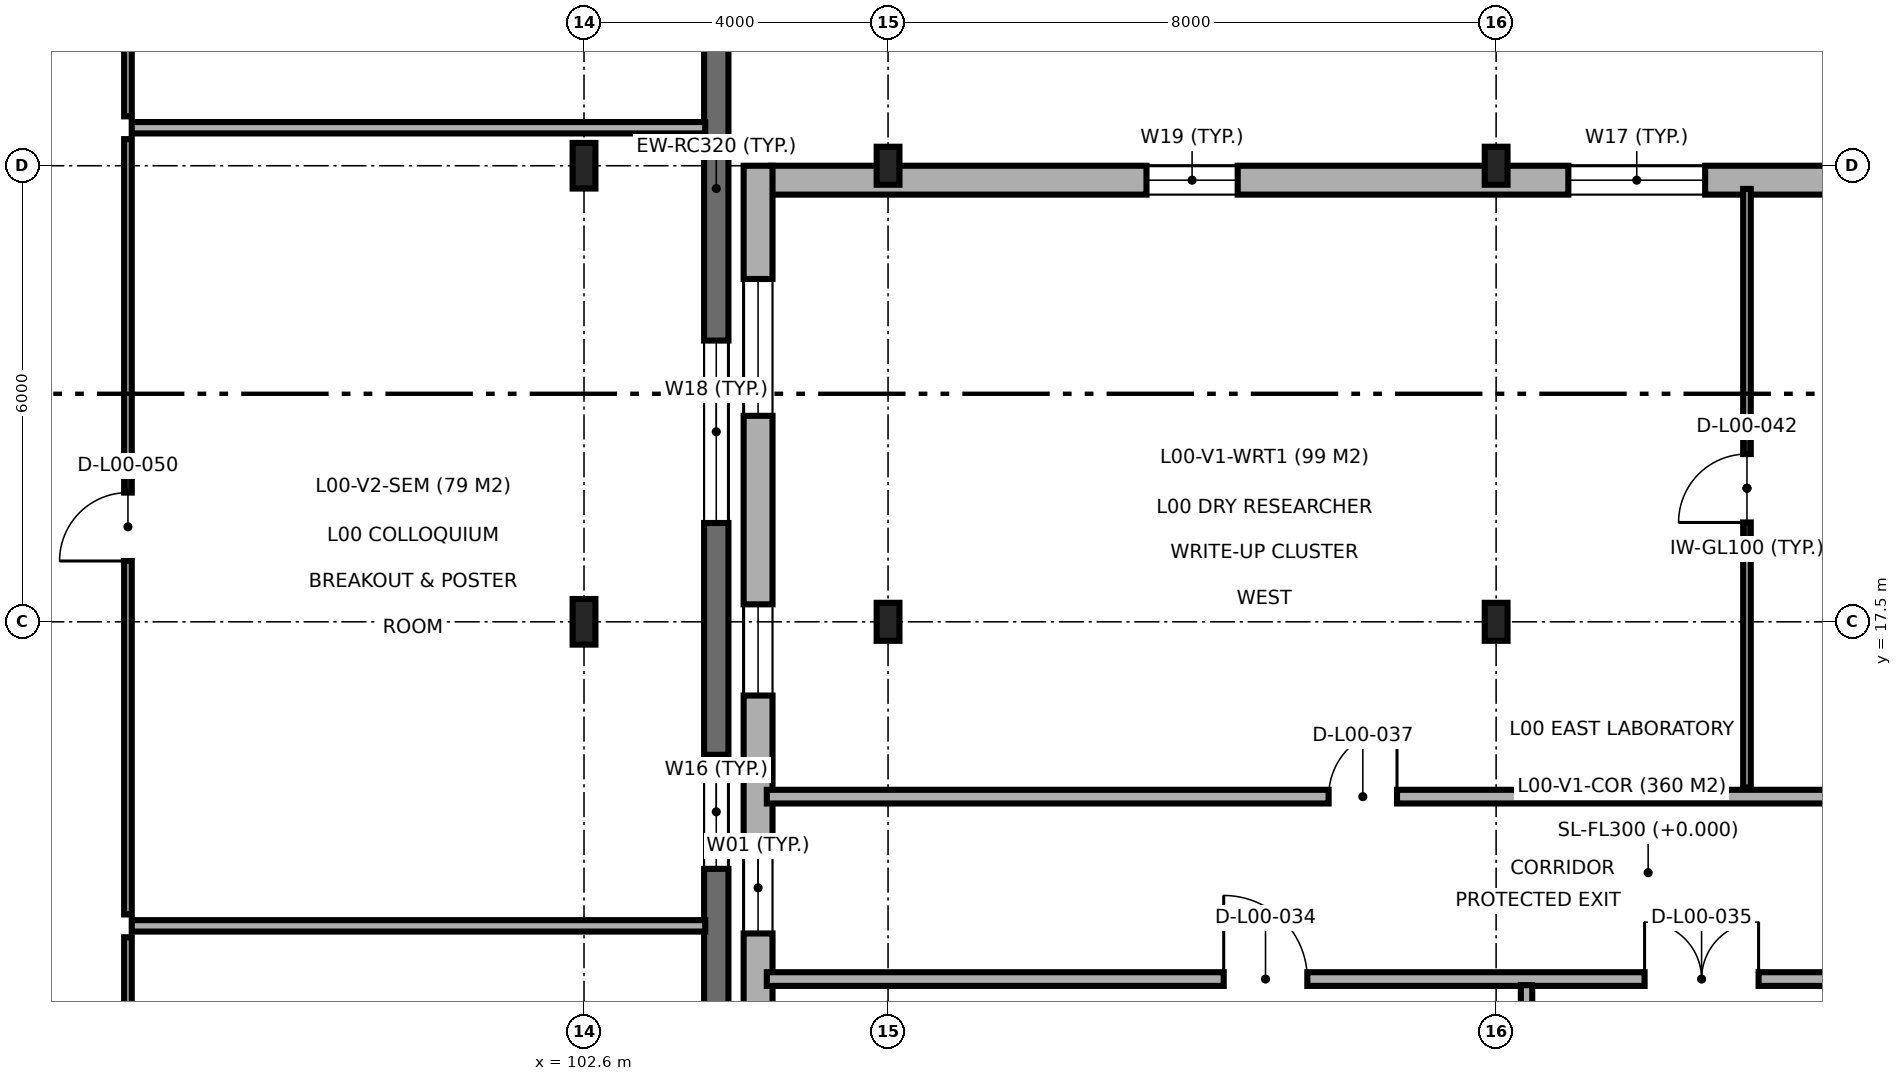
"""IFC4 building model, lengths in metres.
Left out: names, types, materials, properties, quantities, classifications, styles, units other than length and angle.
Written with IfcOpenShell. Run it as: python <this file> out.ifc"""

import sys

from ifc_helpers import new_model, si_unit, direction, frame, frame_2d, origin, origin_2d, place, context, subcontext, project, spatial, rectangle, i_section, extrude, element, fill, save


model = new_model("IFC4")
c1 = context("Model", 3, precision=1e-05, world=origin(), true_north=direction((0.0, 1.0)))
c2 = subcontext(c1, "Body", "Model", "MODEL_VIEW")
j1 = project(units=[si_unit("LENGTHUNIT", "METRE"), si_unit("PLANEANGLEUNIT", "RADIAN")], contexts=[c1])
p1 = place(None, origin())
s1 = spatial("IfcSite", under=j1, at=p1, CompositionType="ELEMENT")
p2 = place(p1, origin())
s2 = spatial("IfcBuilding", under=s1, at=p2, CompositionType="ELEMENT")
p3 = place(p2, origin())
s3 = spatial("IfcBuildingStorey", under=s2, at=p3, CompositionType="ELEMENT", Elevation=0.0)
for number, where, z_axis, x_axis in (
    (1, (102.6, 17.5, 0.0), (0.0, 0.0, 1.0), (1.0, 0.0, 0.0)),
    (2, (102.6, 23.5, 0.0), (0.0, 0.0, 1.0), (1.0, 0.0, 0.0)),
):
    element("IfcColumn", number, at=place(p3, frame(where, z_axis=z_axis, x_axis=x_axis)), inside=s3, PredefinedType="COLUMN", context=c2, shape_type="SweptSolid", body=[
        extrude(i_section(OverallWidth=0.3, OverallDepth=0.6, WebThickness=0.015, FlangeThickness=0.03, FilletRadius=0.027, at=origin_2d()), origin(), (0.0, 0.0, 1.0), 4.8),
    ])
for number, where, z_axis, x_axis in (
    (3, (106.6, 17.5, 0.0), (0.0, 0.0, 1.0), (1.0, 0.0, 0.0)),
    (4, (106.6, 23.5, 0.0), (0.0, 0.0, 1.0), (1.0, 0.0, 0.0)),
    (5, (114.6, 17.5, 0.0), (0.0, 0.0, 1.0), (1.0, 0.0, 0.0)),
    (6, (114.6, 23.5, 0.0), (0.0, 0.0, 1.0), (1.0, 0.0, 0.0)),
):
    element("IfcColumn", number, at=place(p3, frame(where, z_axis=z_axis, x_axis=x_axis)), inside=s3, PredefinedType="COLUMN", context=c2, shape_type="SweptSolid", body=[
        extrude(i_section(OverallWidth=0.3, OverallDepth=0.5, WebThickness=0.014, FlangeThickness=0.028, FilletRadius=0.027, at=origin_2d()), origin(), (0.0, 0.0, 1.0), 4.8),
    ])
p4 = place(p3, frame((138.962, 23.31, 0.0), z_axis=(0.0, 0.0, 1.0), x_axis=(-1.0, 0.0, 0.0)))
e7 = element("IfcWall", 7, at=p4, inside=s3, PredefinedType="SOLIDWALL", context=c2, shape_type="SweptSolid", body=[
    extrude(rectangle(XDim=33.9, YDim=0.38, at=frame_2d((16.95, 0.0))), origin(), (0.0, 0.0, 1.0), 4.55),
])
p5 = place(p4, frame((3.232, 0.0, 0.9)))
e8 = element("IfcOpeningElement", 8, at=p5, cuts=e7, PredefinedType="OPENING", context=c2, shape_type="SweptSolid", body=[
    extrude(rectangle(XDim=2.1, YDim=2.1, at=frame_2d((1.05, 1.05))), frame((0.0, 0.2, 0.0), z_axis=(0.0, -1.0, 0.0), x_axis=(1.0, 0.0, 0.0)), (0.0, 0.0, 1.0), 0.4),
])
p6 = place(p4, frame((11.542, 0.0, 0.9)))
e9 = element("IfcOpeningElement", 9, at=p6, cuts=e7, PredefinedType="OPENING", context=c2, shape_type="SweptSolid", body=[
    extrude(rectangle(XDim=2.7, YDim=2.1, at=frame_2d((1.35, 1.05))), frame((0.0, 0.2, 0.0), z_axis=(0.0, -1.0, 0.0), x_axis=(1.0, 0.0, 0.0)), (0.0, 0.0, 1.0), 0.4),
])
p7 = place(p4, frame((18.232, 0.0, 0.9)))
e10 = element("IfcOpeningElement", 10, at=p7, cuts=e7, PredefinedType="OPENING", context=c2, shape_type="SweptSolid", body=[
    extrude(rectangle(XDim=1.2, YDim=1.5, at=frame_2d((0.6, 0.75))), frame((0.0, 0.2, 0.0), z_axis=(0.0, -1.0, 0.0), x_axis=(1.0, 0.0, 0.0)), (0.0, 0.0, 1.0), 0.4),
])
p8 = place(p4, frame((21.612, 0.0, 0.9)))
e11 = element("IfcOpeningElement", 11, at=p8, cuts=e7, PredefinedType="OPENING", context=c2, shape_type="SweptSolid", body=[
    extrude(rectangle(XDim=1.8, YDim=1.5, at=frame_2d((0.9, 0.75))), frame((0.0, 0.2, 0.0), z_axis=(0.0, -1.0, 0.0), x_axis=(1.0, 0.0, 0.0)), (0.0, 0.0, 1.0), 0.4),
])
p9 = place(p4, frame((27.762, 0.0, 0.9)))
e12 = element("IfcOpeningElement", 12, at=p9, cuts=e7, PredefinedType="OPENING", context=c2, shape_type="SweptSolid", body=[
    extrude(rectangle(XDim=1.2, YDim=2.4, at=frame_2d((0.6, 1.2))), frame((0.0, 0.2, 0.0), z_axis=(0.0, -1.0, 0.0), x_axis=(1.0, 0.0, 0.0)), (0.0, 0.0, 1.0), 0.4),
])
p10 = place(p3, frame((104.89, 23.5, 0.0), z_axis=(0.0, 0.0, 1.0), x_axis=(0.0, -1.0, 0.0)))
e13 = element("IfcWall", 13, at=p10, inside=s3, PredefinedType="SOLIDWALL", context=c2, shape_type="SweptSolid", body=[
    extrude(rectangle(XDim=18.6, YDim=0.38, at=frame_2d((9.3, 0.0))), origin(), (0.0, 0.0, 1.0), 4.55),
])
p11 = place(p10, frame((1.49, 0.0, 0.9)))
e14 = element("IfcOpeningElement", 14, at=p11, cuts=e13, PredefinedType="OPENING", context=c2, shape_type="SweptSolid", body=[
    extrude(rectangle(XDim=1.8, YDim=1.5, at=frame_2d((0.9, 0.75))), frame((0.0, 0.2, 0.0), z_axis=(0.0, -1.0, 0.0), x_axis=(1.0, 0.0, 0.0)), (0.0, 0.0, 1.0), 0.4),
])
p12 = place(p10, frame((5.77, 0.0, 0.9)))
e15 = element("IfcOpeningElement", 15, at=p12, cuts=e13, PredefinedType="OPENING", context=c2, shape_type="SweptSolid", body=[
    extrude(rectangle(XDim=1.2, YDim=2.4, at=frame_2d((0.6, 1.2))), frame((0.0, 0.2, 0.0), z_axis=(0.0, -1.0, 0.0), x_axis=(1.0, 0.0, 0.0)), (0.0, 0.0, 1.0), 0.4),
])
p13 = place(p10, frame((8.9, 0.0, 0.9)))
e16 = element("IfcOpeningElement", 16, at=p13, cuts=e13, PredefinedType="OPENING", context=c2, shape_type="SweptSolid", body=[
    extrude(rectangle(XDim=1.2, YDim=1.8, at=frame_2d((0.6, 0.9))), frame((0.0, 0.2, 0.0), z_axis=(0.0, -1.0, 0.0), x_axis=(1.0, 0.0, 0.0)), (0.0, 0.0, 1.0), 0.4),
])
p14 = place(p10, frame((12.88, 0.0, 0.9)))
e17 = element("IfcOpeningElement", 17, at=p14, cuts=e13, PredefinedType="OPENING", context=c2, shape_type="SweptSolid", body=[
    extrude(rectangle(XDim=3.2, YDim=2.4, at=frame_2d((1.6, 1.2))), frame((0.0, 0.2, 0.0), z_axis=(0.0, -1.0, 0.0), x_axis=(1.0, 0.0, 0.0)), (0.0, 0.0, 1.0), 0.4),
])
p15 = place(p3, frame((104.34, 4.9, 0.0), z_axis=(0.0, 0.0, 1.0), x_axis=(0.0, 1.0, 0.0)))
e18 = element("IfcWall", 18, at=p15, inside=s3, PredefinedType="SHEAR", context=c2, shape_type="SweptSolid", body=[
    extrude(rectangle(XDim=36.6, YDim=0.32, at=frame_2d((18.3, 0.0))), origin(), (0.0, 0.0, 1.0), 4.55),
])
p16 = place(p15, frame((2.97, 0.0, 0.9)))
e19 = element("IfcOpeningElement", 19, at=p16, cuts=e18, PredefinedType="OPENING", context=c2, shape_type="SweptSolid", body=[
    extrude(rectangle(XDim=3.0, YDim=2.1, at=frame_2d((1.5, 1.05))), frame((0.0, 0.17, 0.0), z_axis=(0.0, -1.0, 0.0), x_axis=(1.0, 0.0, 0.0)), (0.0, 0.0, 1.0), 0.34),
])
p17 = place(p15, frame((9.35, 0.0, 0.9)))
e20 = element("IfcOpeningElement", 20, at=p17, cuts=e18, PredefinedType="OPENING", context=c2, shape_type="SweptSolid", body=[
    extrude(rectangle(XDim=1.5, YDim=1.5, at=frame_2d((0.75, 0.75))), frame((0.0, 0.17, 0.0), z_axis=(0.0, -1.0, 0.0), x_axis=(1.0, 0.0, 0.0)), (0.0, 0.0, 1.0), 0.34),
])
p18 = place(p15, frame((13.9, 0.0, 0.9)))
e21 = element("IfcOpeningElement", 21, at=p18, cuts=e18, PredefinedType="OPENING", context=c2, shape_type="SweptSolid", body=[
    extrude(rectangle(XDim=2.4, YDim=1.5, at=frame_2d((1.2, 0.75))), frame((0.0, 0.17, 0.0), z_axis=(0.0, -1.0, 0.0), x_axis=(1.0, 0.0, 0.0)), (0.0, 0.0, 1.0), 0.34),
])
p19 = place(p15, frame((20.625, 0.0, 0.9)))
e22 = element("IfcOpeningElement", 22, at=p19, cuts=e18, PredefinedType="OPENING", context=c2, shape_type="SweptSolid", body=[
    extrude(rectangle(XDim=1.6, YDim=2.4, at=frame_2d((0.8, 1.2))), frame((0.0, 0.17, 0.0), z_axis=(0.0, -1.0, 0.0), x_axis=(1.0, 0.0, 0.0)), (0.0, 0.0, 1.0), 0.34),
])
p20 = place(p15, frame((24.295, 0.0, 0.9)))
e23 = element("IfcOpeningElement", 23, at=p20, cuts=e18, PredefinedType="OPENING", context=c2, shape_type="SweptSolid", body=[
    extrude(rectangle(XDim=2.6, YDim=2.4, at=frame_2d((1.3, 1.2))), frame((0.0, 0.17, 0.0), z_axis=(0.0, -1.0, 0.0), x_axis=(1.0, 0.0, 0.0)), (0.0, 0.0, 1.0), 0.34),
])
p21 = place(p15, frame((29.315, 0.0, 0.9)))
e24 = element("IfcOpeningElement", 24, at=p21, cuts=e18, PredefinedType="OPENING", context=c2, shape_type="SweptSolid", body=[
    extrude(rectangle(XDim=0.9, YDim=1.8, at=frame_2d((0.45, 0.9))), frame((0.0, 0.17, 0.0), z_axis=(0.0, -1.0, 0.0), x_axis=(1.0, 0.0, 0.0)), (0.0, 0.0, 1.0), 0.34),
])
p22 = place(p15, frame((32.235, 0.0, 0.9)))
e25 = element("IfcOpeningElement", 25, at=p22, cuts=e18, PredefinedType="OPENING", context=c2, shape_type="SweptSolid", body=[
    extrude(rectangle(XDim=3.4, YDim=1.95, at=frame_2d((1.7, 0.975))), frame((0.0, 0.17, 0.0), z_axis=(0.0, -1.0, 0.0), x_axis=(1.0, 0.0, 0.0)), (0.0, 0.0, 1.0), 0.34),
])
p23 = place(p3, frame((105.005, 12.8, 0.0), z_axis=(0.0, 0.0, 1.0), x_axis=(1.0, 0.0, 0.0)))
e26 = element("IfcWall", 26, at=p23, inside=s3, PredefinedType="PARTITIONING", context=c2, shape_type="SweptSolid", body=[
    extrude(rectangle(XDim=34.495, YDim=0.18, at=frame_2d((17.248, 0.0))), origin(), (0.0, 0.0, 1.0), 4.55),
])
p24 = place(p23, frame((6.011, 0.0, 0.0)))
e27 = element("IfcOpeningElement", 27, at=p24, cuts=e26, PredefinedType="OPENING", context=c2, shape_type="SweptSolid", body=[
    extrude(rectangle(XDim=1.1, YDim=2.15, at=frame_2d((0.55, 1.075))), frame((0.0, 0.1, 0.0), z_axis=(0.0, -1.0, 0.0), x_axis=(1.0, 0.0, 0.0)), (0.0, 0.0, 1.0), 0.2),
])
p25 = place(p23, frame((11.548, 0.0, 0.0)))
e28 = element("IfcOpeningElement", 28, at=p25, cuts=e26, PredefinedType="OPENING", context=c2, shape_type="SweptSolid", body=[
    extrude(rectangle(XDim=1.5, YDim=2.2, at=frame_2d((0.75, 1.1))), frame((0.0, 0.1, 0.0), z_axis=(0.0, -1.0, 0.0), x_axis=(1.0, 0.0, 0.0)), (0.0, 0.0, 1.0), 0.2),
])
p26 = place(p23, frame((27.548, 0.0, 0.0)))
e29 = element("IfcOpeningElement", 29, at=p26, cuts=e26, PredefinedType="OPENING", context=c2, shape_type="SweptSolid", body=[
    extrude(rectangle(XDim=0.9, YDim=2.1, at=frame_2d((0.45, 1.05))), frame((0.0, 0.1, 0.0), z_axis=(0.0, -1.0, 0.0), x_axis=(1.0, 0.0, 0.0)), (0.0, 0.0, 1.0), 0.2),
])
p27 = place(p3, frame((105.005, 15.2, 0.0), z_axis=(0.0, 0.0, 1.0), x_axis=(1.0, 0.0, 0.0)))
e30 = element("IfcWall", 30, at=p27, inside=s3, PredefinedType="PARTITIONING", context=c2, shape_type="SweptSolid", body=[
    extrude(rectangle(XDim=34.495, YDim=0.18, at=frame_2d((17.248, 0.0))), origin(), (0.0, 0.0, 1.0), 4.55),
])
p28 = place(p27, frame((7.391, 0.0, 0.0)))
e31 = element("IfcOpeningElement", 31, at=p28, cuts=e30, PredefinedType="OPENING", context=c2, shape_type="SweptSolid", body=[
    extrude(rectangle(XDim=0.9, YDim=2.1, at=frame_2d((0.45, 1.05))), frame((0.0, 0.1, 0.0), z_axis=(0.0, -1.0, 0.0), x_axis=(1.0, 0.0, 0.0)), (0.0, 0.0, 1.0), 0.2),
])
p29 = place(p27, frame((18.45, 0.0, 0.0)))
e32 = element("IfcOpeningElement", 32, at=p29, cuts=e30, PredefinedType="OPENING", context=c2, shape_type="SweptSolid", body=[
    extrude(rectangle(XDim=0.95, YDim=2.1, at=frame_2d((0.475, 1.05))), frame((0.0, 0.1, 0.0), z_axis=(0.0, -1.0, 0.0), x_axis=(1.0, 0.0, 0.0)), (0.0, 0.0, 1.0), 0.2),
])
p30 = place(p27, frame((27.466, 0.0, 0.0)))
e33 = element("IfcOpeningElement", 33, at=p30, cuts=e30, PredefinedType="OPENING", context=c2, shape_type="SweptSolid", body=[
    extrude(rectangle(XDim=1.0, YDim=2.15, at=frame_2d((0.5, 1.075))), frame((0.0, 0.1, 0.0), z_axis=(0.0, -1.0, 0.0), x_axis=(1.0, 0.0, 0.0)), (0.0, 0.0, 1.0), 0.2),
])
p31 = place(p3, frame((115.0, 5.205, 0.0), z_axis=(0.0, 0.0, 1.0), x_axis=(0.0, 1.0, 0.0)))
e34 = element("IfcWall", 34, at=p31, inside=s3, PredefinedType="PARTITIONING", context=c2, shape_type="SweptSolid", body=[
    extrude(rectangle(XDim=7.515, YDim=0.15, at=frame_2d((3.757, 0.0))), origin(), (0.0, 0.0, 1.0), 4.55),
])
p32 = place(p31, frame((3.258, 0.0, 0.0)))
e35 = element("IfcOpeningElement", 35, at=p32, cuts=e34, PredefinedType="OPENING", context=c2, shape_type="SweptSolid", body=[
    extrude(rectangle(XDim=1.0, YDim=2.15, at=frame_2d((0.5, 1.075))), frame((0.0, 0.085, 0.0), z_axis=(0.0, -1.0, 0.0), x_axis=(1.0, 0.0, 0.0)), (0.0, 0.0, 1.0), 0.17),
])
p33 = place(p3, frame((117.9, 15.32, 0.0), z_axis=(0.0, 0.0, 1.0), x_axis=(0.0, 1.0, 0.0)))
e36 = element("IfcWall", 36, at=p33, inside=s3, PredefinedType="PARTITIONING", context=c2, shape_type="SweptSolid", body=[
    extrude(rectangle(XDim=7.875, YDim=0.1, at=frame_2d((3.938, 0.0))), origin(), (0.0, 0.0, 1.0), 4.55),
])
p34 = place(p33, frame((3.487, 0.0, 0.0)))
e37 = element("IfcOpeningElement", 37, at=p34, cuts=e36, PredefinedType="OPENING", context=c2, shape_type="SweptSolid", body=[
    extrude(rectangle(XDim=0.9, YDim=2.1, at=frame_2d((0.45, 1.05))), frame((0.0, 0.06, 0.0), z_axis=(0.0, -1.0, 0.0), x_axis=(1.0, 0.0, 0.0)), (0.0, 0.0, 1.0), 0.12),
])
for number, where, z_axis, x_axis in (
    (38, (96.65, 13.5, 0.0), (0.0, 0.0, 1.0), (1.0, 0.0, 0.0)),
    (39, (96.65, 24.0, 0.0), (0.0, 0.0, 1.0), (1.0, 0.0, 0.0)),
):
    element("IfcWall", number, at=place(p3, frame(where, z_axis=z_axis, x_axis=x_axis)), inside=s3, PredefinedType="PARTITIONING", context=c2, shape_type="SweptSolid", body=[
        extrude(rectangle(XDim=7.545, YDim=0.15, at=frame_2d((3.772, 0.0))), origin(), (0.0, 0.0, 1.0), 4.55),
    ])
p35 = place(p3, frame((96.6, 5.75, 0.0), z_axis=(0.0, 0.0, 1.0), x_axis=(0.0, 1.0, 0.0)))
e40 = element("IfcWall", 40, at=p35, inside=s3, PredefinedType="PARTITIONING", context=c2, shape_type="SweptSolid", body=[
    extrude(rectangle(XDim=7.6, YDim=0.1, at=frame_2d((3.8, 0.0))), origin(), (0.0, 0.0, 1.0), 4.55),
])
p36 = place(p35, frame((3.11, 0.0, 0.0)))
e41 = element("IfcOpeningElement", 41, at=p36, cuts=e40, PredefinedType="OPENING", context=c2, shape_type="SweptSolid", body=[
    extrude(rectangle(XDim=0.9, YDim=2.1, at=frame_2d((0.45, 1.05))), frame((0.0, 0.06, 0.0), z_axis=(0.0, -1.0, 0.0), x_axis=(1.0, 0.0, 0.0)), (0.0, 0.0, 1.0), 0.12),
])
p37 = place(p3, frame((96.6, 13.65, 0.0), z_axis=(0.0, 0.0, 1.0), x_axis=(0.0, 1.0, 0.0)))
e42 = element("IfcWall", 42, at=p37, inside=s3, PredefinedType="PARTITIONING", context=c2, shape_type="SweptSolid", body=[
    extrude(rectangle(XDim=10.2, YDim=0.1, at=frame_2d((5.1, 0.0))), origin(), (0.0, 0.0, 1.0), 4.55),
])
p38 = place(p37, frame((4.65, 0.0, 0.0)))
e43 = element("IfcOpeningElement", 43, at=p38, cuts=e42, PredefinedType="OPENING", context=c2, shape_type="SweptSolid", body=[
    extrude(rectangle(XDim=0.9, YDim=2.1, at=frame_2d((0.45, 1.05))), frame((0.0, 0.06, 0.0), z_axis=(0.0, -1.0, 0.0), x_axis=(1.0, 0.0, 0.0)), (0.0, 0.0, 1.0), 0.12),
])
p39 = place(p3, frame((96.6, 24.15, 0.0), z_axis=(0.0, 0.0, 1.0), x_axis=(0.0, 1.0, 0.0)))
e44 = element("IfcWall", 44, at=p39, inside=s3, PredefinedType="PARTITIONING", context=c2, shape_type="SweptSolid", body=[
    extrude(rectangle(XDim=17.045, YDim=0.1, at=frame_2d((8.522, 0.0))), origin(), (0.0, 0.0, 1.0), 4.55),
])
p40 = place(p39, frame((8.048, 0.0, 0.0)))
e45 = element("IfcOpeningElement", 45, at=p40, cuts=e44, PredefinedType="OPENING", context=c2, shape_type="SweptSolid", body=[
    extrude(rectangle(XDim=0.95, YDim=2.1, at=frame_2d((0.475, 1.05))), frame((0.0, 0.06, 0.0), z_axis=(0.0, -1.0, 0.0), x_axis=(1.0, 0.0, 0.0)), (0.0, 0.0, 1.0), 0.12),
])
p41 = place(p8, origin())
e46 = element("IfcWindow", 46, at=p41, inside=s3, PartitioningType="SINGLE_PANEL", PredefinedType="WINDOW", context=c2, shape_type="SweptSolid", body=[
    extrude(rectangle(XDim=1.8, YDim=1.5, at=frame_2d((0.9, 0.75))), frame((0.0, 0.03, 0.0), z_axis=(0.0, -1.0, 0.0), x_axis=(1.0, 0.0, 0.0)), (0.0, 0.0, 1.0), 0.06),
])
fill(e11, e46)
p42 = place(p9, origin())
e47 = element("IfcWindow", 47, at=p42, inside=s3, PartitioningType="SINGLE_PANEL", PredefinedType="WINDOW", context=c2, shape_type="SweptSolid", body=[
    extrude(rectangle(XDim=1.2, YDim=2.4, at=frame_2d((0.6, 1.2))), frame((0.0, 0.03, 0.0), z_axis=(0.0, -1.0, 0.0), x_axis=(1.0, 0.0, 0.0)), (0.0, 0.0, 1.0), 0.06),
])
fill(e12, e47)
p43 = place(p11, origin())
e48 = element("IfcWindow", 48, at=p43, inside=s3, PartitioningType="SINGLE_PANEL", PredefinedType="WINDOW", context=c2, shape_type="SweptSolid", body=[
    extrude(rectangle(XDim=1.8, YDim=1.5, at=frame_2d((0.9, 0.75))), frame((0.0, 0.03, 0.0), z_axis=(0.0, -1.0, 0.0), x_axis=(1.0, 0.0, 0.0)), (0.0, 0.0, 1.0), 0.06),
])
fill(e14, e48)
p44 = place(p12, origin())
e49 = element("IfcWindow", 49, at=p44, inside=s3, PartitioningType="SINGLE_PANEL", PredefinedType="WINDOW", context=c2, shape_type="SweptSolid", body=[
    extrude(rectangle(XDim=1.2, YDim=2.4, at=frame_2d((0.6, 1.2))), frame((0.0, 0.03, 0.0), z_axis=(0.0, -1.0, 0.0), x_axis=(1.0, 0.0, 0.0)), (0.0, 0.0, 1.0), 0.06),
])
fill(e15, e49)
p45 = place(p13, origin())
e50 = element("IfcWindow", 50, at=p45, inside=s3, PartitioningType="SINGLE_PANEL", PredefinedType="WINDOW", context=c2, shape_type="SweptSolid", body=[
    extrude(rectangle(XDim=1.2, YDim=1.8, at=frame_2d((0.6, 0.9))), frame((0.0, 0.03, 0.0), z_axis=(0.0, -1.0, 0.0), x_axis=(1.0, 0.0, 0.0)), (0.0, 0.0, 1.0), 0.06),
])
fill(e16, e50)
p46 = place(p17, origin())
e51 = element("IfcWindow", 51, at=p46, inside=s3, PartitioningType="SINGLE_PANEL", PredefinedType="WINDOW", context=c2, shape_type="SweptSolid", body=[
    extrude(rectangle(XDim=1.5, YDim=1.5, at=frame_2d((0.75, 0.75))), frame((0.0, 0.03, 0.0), z_axis=(0.0, -1.0, 0.0), x_axis=(1.0, 0.0, 0.0)), (0.0, 0.0, 1.0), 0.06),
])
fill(e20, e51)
p47 = place(p18, origin())
e52 = element("IfcWindow", 52, at=p47, inside=s3, PartitioningType="SINGLE_PANEL", PredefinedType="WINDOW", context=c2, shape_type="SweptSolid", body=[
    extrude(rectangle(XDim=2.4, YDim=1.5, at=frame_2d((1.2, 0.75))), frame((0.0, 0.03, 0.0), z_axis=(0.0, -1.0, 0.0), x_axis=(1.0, 0.0, 0.0)), (0.0, 0.0, 1.0), 0.06),
])
fill(e21, e52)
p48 = place(p24, origin())
e53 = element("IfcDoor", 53, at=p48, inside=s3, OperationType="SINGLE_SWING_LEFT", PredefinedType="DOOR", context=c2, shape_type="SweptSolid", body=[
    extrude(rectangle(XDim=1.1, YDim=2.15, at=frame_2d((0.55, 1.075))), frame((0.0, 0.025, 0.0), z_axis=(0.0, -1.0, 0.0), x_axis=(1.0, 0.0, 0.0)), (0.0, 0.0, 1.0), 0.05),
])
fill(e27, e53)
p49 = place(p25, origin())
e54 = element("IfcDoor", 54, at=p49, inside=s3, OperationType="DOUBLE_DOOR_SINGLE_SWING", PredefinedType="DOOR", context=c2, shape_type="SweptSolid", body=[
    extrude(rectangle(XDim=1.5, YDim=2.2, at=frame_2d((0.75, 1.1))), frame((0.0, 0.025, 0.0), z_axis=(0.0, -1.0, 0.0), x_axis=(1.0, 0.0, 0.0)), (0.0, 0.0, 1.0), 0.05),
])
fill(e28, e54)
p50 = place(p28, origin())
e55 = element("IfcDoor", 55, at=p50, inside=s3, OperationType="SINGLE_SWING_RIGHT", PredefinedType="DOOR", context=c2, shape_type="SweptSolid", body=[
    extrude(rectangle(XDim=0.9, YDim=2.1, at=frame_2d((0.45, 1.05))), frame((0.0, 0.025, 0.0), z_axis=(0.0, -1.0, 0.0), x_axis=(1.0, 0.0, 0.0)), (0.0, 0.0, 1.0), 0.05),
])
fill(e31, e55)
p51 = place(p34, origin())
e56 = element("IfcDoor", 56, at=p51, inside=s3, OperationType="SINGLE_SWING_LEFT", PredefinedType="DOOR", context=c2, shape_type="SweptSolid", body=[
    extrude(rectangle(XDim=0.9, YDim=2.1, at=frame_2d((0.45, 1.05))), frame((0.0, 0.025, 0.0), z_axis=(0.0, -1.0, 0.0), x_axis=(1.0, 0.0, 0.0)), (0.0, 0.0, 1.0), 0.05),
])
fill(e37, e56)
p52 = place(p38, origin())
e57 = element("IfcDoor", 57, at=p52, inside=s3, OperationType="SINGLE_SWING_LEFT", PredefinedType="DOOR", context=c2, shape_type="SweptSolid", body=[
    extrude(rectangle(XDim=0.9, YDim=2.1, at=frame_2d((0.45, 1.05))), frame((0.0, 0.025, 0.0), z_axis=(0.0, -1.0, 0.0), x_axis=(1.0, 0.0, 0.0)), (0.0, 0.0, 1.0), 0.05),
])
fill(e43, e57)
save(model, sys.argv[1])
